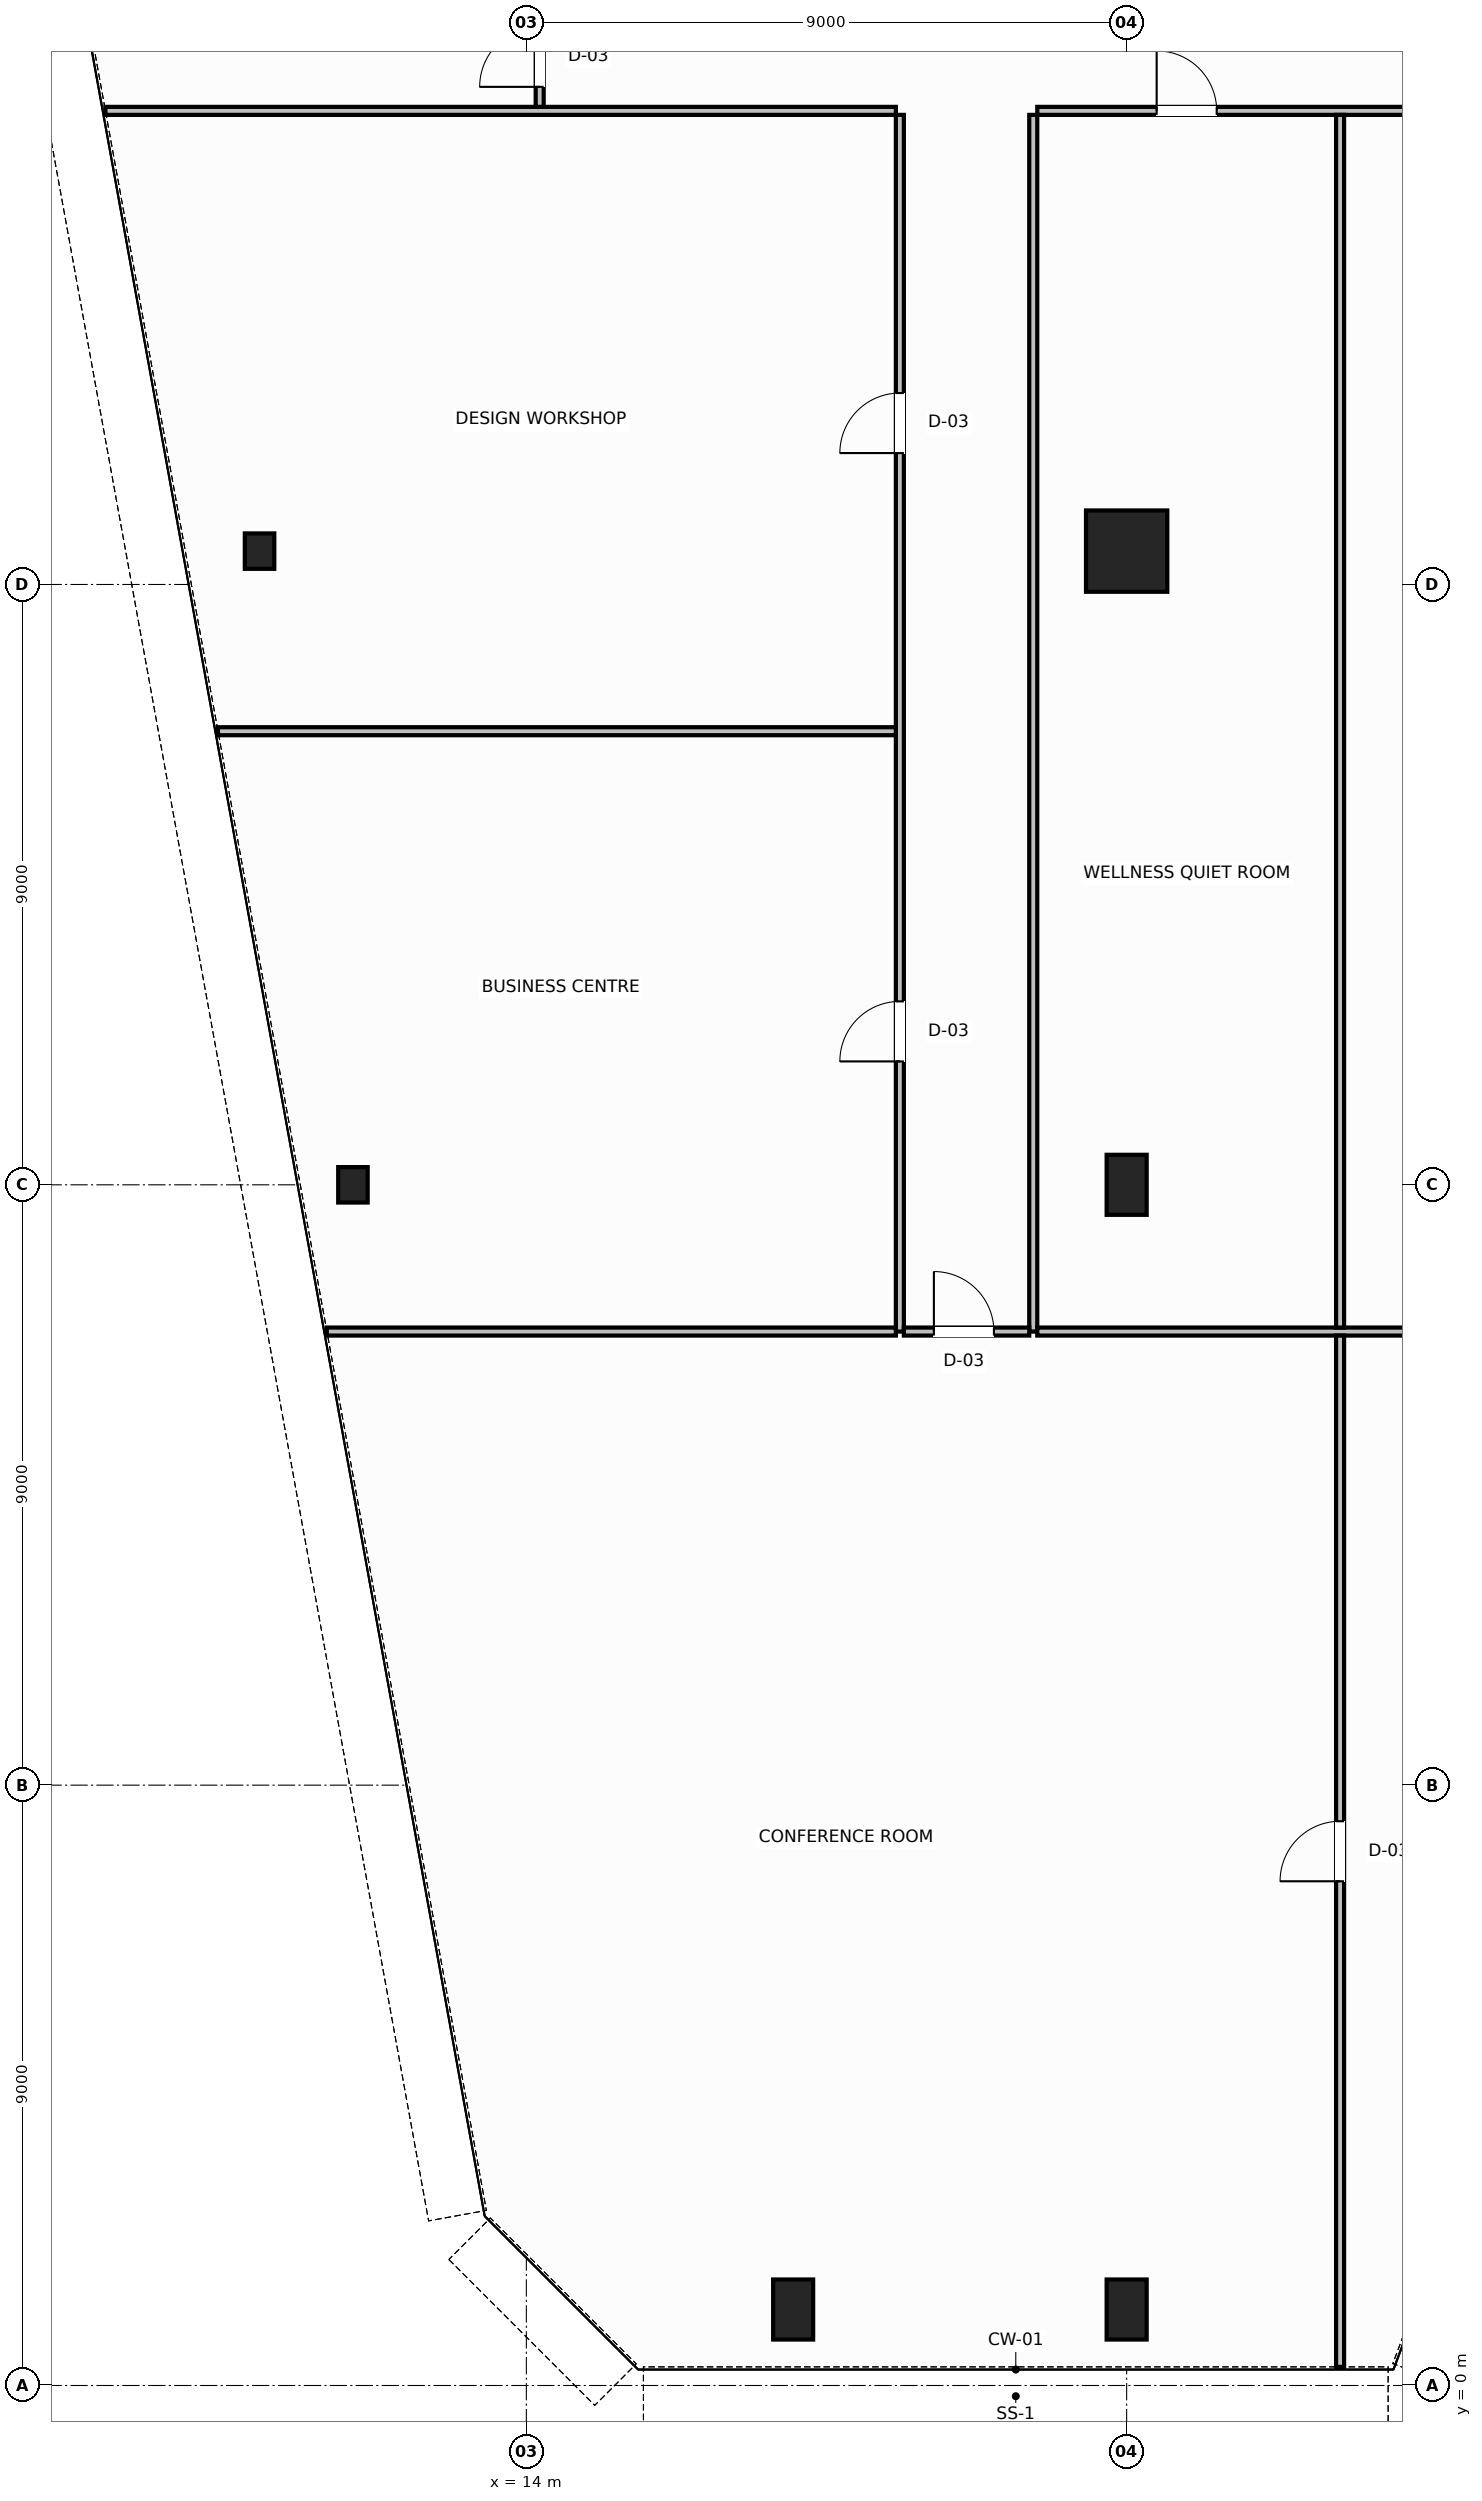
"""IFC4 building model, lengths in metres.
Left out: names, types, materials, properties, quantities, classifications, styles, units other than length and angle.
Written with IfcOpenShell. Run it as: python <this file> out.ifc"""

import sys

from ifc_helpers import new_model, si_unit, direction, frame, frame_2d, origin, origin_2d, place, context, subcontext, project, spatial, rectangle, hollow_rectangle, hollow_circle, i_section, extrude, source, transform, mapped, element, fill, save


model = new_model("IFC4")
c1 = context("Model", 3, precision=1e-05, world=origin(), true_north=direction((0.0, 1.0)))
c2 = subcontext(c1, "Body", "Model", "MODEL_VIEW")
j1 = project(units=[si_unit("LENGTHUNIT", "METRE"), si_unit("PLANEANGLEUNIT", "RADIAN")], contexts=[c1])
p1 = place(None, origin())
s1 = spatial("IfcSite", under=j1, at=p1, CompositionType="ELEMENT")
p2 = place(p1, origin())
s2 = spatial("IfcBuilding", under=s1, at=p2, CompositionType="ELEMENT")
p3 = place(p2, frame((0.0, 0.0, 22.6)))
s3 = spatial("IfcBuildingStorey", under=s2, at=p3, CompositionType="ELEMENT", Elevation=22.6)
m1 = source(origin(), c2, "Body", "SweptSolid", [
    extrude(i_section(OverallWidth=0.442, OverallDepth=0.531, WebThickness=0.065, FlangeThickness=0.076, FilletRadius=0.015, at=origin_2d()), origin(), (0.0, 0.0, 1.0), 3.8),
])
for number, where, z_axis, x_axis in (
    (1, (10.0, 27.5, 0.0), (0.0, 0.0, 1.0), (1.0, 0.0, 0.0)),
    (2, (11.4, 18.0, 0.0), (0.0, 0.0, 1.0), (1.0, 0.0, 0.0)),
):
    element("IfcColumn", number, at=place(p3, frame(where, z_axis=z_axis, x_axis=x_axis)), inside=s3, PredefinedType="COLUMN", context=c2, shape_type="MappedRepresentation", body=[
        mapped(m1, transform((0.0, 0.0, 0.0), scale=1.0)),
    ])
m2 = source(origin(), c2, "Body", "SweptSolid", [
    extrude(hollow_circle(Radius=0.61, WallThickness=0.05, at=origin_2d()), origin(), (0.0, 0.0, 1.0), 3.8),
])
p4 = place(p3, frame((23.0, 27.5, 0.0), z_axis=(0.0, 0.0, 1.0), x_axis=(1.0, 0.0, 0.0)))
e3 = element("IfcColumn", 3, at=p4, inside=s3, PredefinedType="COLUMN", context=c2, shape_type="MappedRepresentation", body=[
    mapped(m2, transform((0.0, 0.0, 0.0), scale=1.0)),
])
m3 = source(origin(), c2, "Body", "SweptSolid", [
    extrude(hollow_rectangle(XDim=0.6, YDim=0.9, WallThickness=0.04, InnerFilletRadius=0.04, OuterFilletRadius=0.08, at=origin_2d()), origin(), (0.0, 0.0, 1.0), 3.8),
])
p5 = place(p3, frame((23.0, 18.0, 0.0), z_axis=(0.0, 0.0, 1.0), x_axis=(1.0, 0.0, 0.0)))
e4 = element("IfcColumn", 4, at=p5, inside=s3, PredefinedType="COLUMN", context=c2, shape_type="MappedRepresentation", body=[
    mapped(m3, transform((0.0, 0.0, 0.0), scale=1.0)),
])
m4 = source(origin(), c2, "Body", "SweptSolid", [
    extrude(hollow_rectangle(XDim=0.6, YDim=0.9, WallThickness=0.04, InnerFilletRadius=0.04, OuterFilletRadius=0.08, at=origin_2d()), origin(), (0.0, 0.0, 1.0), 3.743),
])
for number, where, z_axis, x_axis in (
    (5, (18.0, 1.139, 0.032), (0.0, 0.064, 0.998), (-1.0, 0.0, 0.0)),
    (6, (23.0, 1.139, 0.032), (0.0, 0.064, 0.998), (-1.0, 0.0, 0.0)),
):
    element("IfcColumn", number, at=place(p3, frame(where, z_axis=z_axis, x_axis=x_axis)), inside=s3, PredefinedType="COLUMN", context=c2, shape_type="MappedRepresentation", body=[
        mapped(m4, transform((0.0, 0.0, 0.0), scale=1.0)),
    ])
p6 = place(p3, frame((21.66, 34.1, 0.0), z_axis=(0.0, 0.0, 1.0), x_axis=(1.0, 0.0, 0.0)))
e7 = element("IfcWall", 7, at=p6, inside=s3, PredefinedType="PARTITIONING", context=c2, shape_type="SweptSolid", body=[
    extrude(rectangle(XDim=24.68, YDim=0.12, at=frame_2d((12.34, 0.0))), origin(), (0.0, 0.0, 1.0), 3.58),
])
p7 = place(p6, frame((1.79, 0.0, 0.0)))
e8 = element("IfcOpeningElement", 8, at=p7, cuts=e7, PredefinedType="OPENING", context=c2, shape_type="SweptSolid", body=[
    extrude(rectangle(XDim=0.9, YDim=2.15, at=frame_2d((0.45, 1.075))), frame((0.0, 0.07, 0.0), z_axis=(0.0, -1.0, 0.0), x_axis=(1.0, 0.0, 0.0)), (0.0, 0.0, 1.0), 0.14),
])
p8 = place(p6, frame((14.19, 0.0, 0.0)))
e9 = element("IfcOpeningElement", 9, at=p8, cuts=e7, PredefinedType="OPENING", context=c2, shape_type="SweptSolid", body=[
    extrude(rectangle(XDim=0.9, YDim=2.15, at=frame_2d((0.45, 1.075))), frame((0.0, 0.07, 0.0), z_axis=(0.0, -1.0, 0.0), x_axis=(1.0, 0.0, 0.0)), (0.0, 0.0, 1.0), 0.14),
])
p9 = place(p3, frame((7.689, 34.1, 0.0), z_axis=(0.0, 0.0, 1.0), x_axis=(1.0, 0.0, 0.0)))
e10 = element("IfcWall", 10, at=p9, inside=s3, PredefinedType="PARTITIONING", context=c2, shape_type="SweptSolid", body=[
    extrude(rectangle(XDim=11.851, YDim=0.12, at=frame_2d((5.926, 0.0))), origin(), (0.0, 0.0, 1.0), 3.58),
])
p10 = place(p3, frame((14.2, 34.16, 0.0), z_axis=(0.0, 0.0, 1.0), x_axis=(0.0, 1.0, 0.0)))
e11 = element("IfcWall", 11, at=p10, inside=s3, PredefinedType="PARTITIONING", context=c2, shape_type="SweptSolid", body=[
    extrude(rectangle(XDim=2.28, YDim=0.12, at=frame_2d((1.14, 0.0))), origin(), (0.0, 0.0, 1.0), 3.58),
])
p11 = place(p10, frame((0.3, 0.0, 0.0)))
e12 = element("IfcOpeningElement", 12, at=p11, cuts=e11, PredefinedType="OPENING", context=c2, shape_type="SweptSolid", body=[
    extrude(rectangle(XDim=0.9, YDim=2.15, at=frame_2d((0.45, 1.075))), frame((0.0, 0.07, 0.0), z_axis=(0.0, -1.0, 0.0), x_axis=(1.0, 0.0, 0.0)), (0.0, 0.0, 1.0), 0.14),
])
p12 = place(p3, frame((19.6, 15.8, 0.0), z_axis=(0.0, 0.0, 1.0), x_axis=(0.0, 1.0, 0.0)))
e13 = element("IfcWall", 13, at=p12, inside=s3, PredefinedType="PARTITIONING", context=c2, shape_type="SweptSolid", body=[
    extrude(rectangle(XDim=18.24, YDim=0.12, at=frame_2d((9.12, 0.0))), origin(), (0.0, 0.0, 1.0), 3.58),
])
p13 = place(p12, frame((4.05, 0.0, 0.0)))
e14 = element("IfcOpeningElement", 14, at=p13, cuts=e13, PredefinedType="OPENING", context=c2, shape_type="SweptSolid", body=[
    extrude(rectangle(XDim=0.9, YDim=2.15, at=frame_2d((0.45, 1.075))), frame((0.0, 0.07, 0.0), z_axis=(0.0, -1.0, 0.0), x_axis=(1.0, 0.0, 0.0)), (0.0, 0.0, 1.0), 0.14),
])
p14 = place(p12, frame((13.17, 0.0, 0.0)))
e15 = element("IfcOpeningElement", 15, at=p14, cuts=e13, PredefinedType="OPENING", context=c2, shape_type="SweptSolid", body=[
    extrude(rectangle(XDim=0.9, YDim=2.15, at=frame_2d((0.45, 1.075))), frame((0.0, 0.07, 0.0), z_axis=(0.0, -1.0, 0.0), x_axis=(1.0, 0.0, 0.0)), (0.0, 0.0, 1.0), 0.14),
])
p15 = place(p3, frame((21.6, 15.8, 0.0), z_axis=(0.0, 0.0, 1.0), x_axis=(0.0, 1.0, 0.0)))
e16 = element("IfcWall", 16, at=p15, inside=s3, PredefinedType="PARTITIONING", context=c2, shape_type="SweptSolid", body=[
    extrude(rectangle(XDim=18.24, YDim=0.12, at=frame_2d((9.12, 0.0))), origin(), (0.0, 0.0, 1.0), 3.58),
])
p16 = place(p3, frame((19.66, 15.8, 0.0), z_axis=(0.0, 0.0, 1.0), x_axis=(1.0, 0.0, 0.0)))
e17 = element("IfcWall", 17, at=p16, inside=s3, PredefinedType="PARTITIONING", context=c2, shape_type="SweptSolid", body=[
    extrude(rectangle(XDim=1.88, YDim=0.12, at=frame_2d((0.94, 0.0))), origin(), (0.0, 0.0, 1.0), 3.58),
])
p17 = place(p16, frame((0.45, 0.0, 0.0)))
e18 = element("IfcOpeningElement", 18, at=p17, cuts=e17, PredefinedType="OPENING", context=c2, shape_type="SweptSolid", body=[
    extrude(rectangle(XDim=0.9, YDim=2.15, at=frame_2d((0.45, 1.075))), frame((0.0, 0.07, 0.0), z_axis=(0.0, -1.0, 0.0), x_axis=(1.0, 0.0, 0.0)), (0.0, 0.0, 1.0), 0.14),
])
p18 = place(p3, frame((11.01, 15.8, 0.0), z_axis=(0.0, 0.0, 1.0), x_axis=(1.0, 0.0, 0.0)))
e19 = element("IfcWall", 19, at=p18, inside=s3, PredefinedType="PARTITIONING", context=c2, shape_type="SweptSolid", body=[
    extrude(rectangle(XDim=8.531, YDim=0.12, at=frame_2d((4.265, 0.0))), origin(), (0.0, 0.0, 1.0), 3.58),
])
p19 = place(p3, frame((9.376, 24.8, 0.0), z_axis=(0.0, 0.0, 1.0), x_axis=(1.0, 0.0, 0.0)))
e20 = element("IfcWall", 20, at=p19, inside=s3, PredefinedType="PARTITIONING", context=c2, shape_type="SweptSolid", body=[
    extrude(rectangle(XDim=10.164, YDim=0.12, at=frame_2d((5.082, 0.0))), origin(), (0.0, 0.0, 1.0), 3.58),
])
p20 = place(p3, frame((21.66, 15.8, 0.0), z_axis=(0.0, 0.0, 1.0), x_axis=(1.0, 0.0, 0.0)))
e21 = element("IfcWall", 21, at=p20, inside=s3, PredefinedType="PARTITIONING", context=c2, shape_type="SweptSolid", body=[
    extrude(rectangle(XDim=24.68, YDim=0.12, at=frame_2d((12.34, 0.0))), origin(), (0.0, 0.0, 1.0), 3.58),
])
p21 = place(p3, frame((26.2, 15.86, 0.0), z_axis=(0.0, 0.0, 1.0), x_axis=(0.0, 1.0, 0.0)))
e22 = element("IfcWall", 22, at=p21, inside=s3, PredefinedType="PARTITIONING", context=c2, shape_type="SweptSolid", body=[
    extrude(rectangle(XDim=18.18, YDim=0.12, at=frame_2d((9.09, 0.0))), origin(), (0.0, 0.0, 1.0), 3.58),
])
p22 = place(p3, frame((26.2, 0.279, 0.0), z_axis=(0.0, 0.0, 1.0), x_axis=(0.0, 1.0, 0.0)))
e23 = element("IfcWall", 23, at=p22, inside=s3, PredefinedType="PARTITIONING", context=c2, shape_type="SweptSolid", body=[
    extrude(rectangle(XDim=15.461, YDim=0.12, at=frame_2d((7.73, 0.0))), origin(), (0.0, 0.0, 1.0), 3.58),
])
p23 = place(p22, frame((7.28, 0.0, 0.0)))
e24 = element("IfcOpeningElement", 24, at=p23, cuts=e23, PredefinedType="OPENING", context=c2, shape_type="SweptSolid", body=[
    extrude(rectangle(XDim=0.9, YDim=2.15, at=frame_2d((0.45, 1.075))), frame((0.0, 0.07, 0.0), z_axis=(0.0, -1.0, 0.0), x_axis=(1.0, 0.0, 0.0)), (0.0, 0.0, 1.0), 0.14),
])
m5 = source(origin(), c2, "Body", "SweptSolid", [
    extrude(rectangle(XDim=0.9, YDim=2.15, at=frame_2d((0.45, 1.075))), frame((0.0, 0.025, 0.0), z_axis=(0.0, -1.0, 0.0), x_axis=(1.0, 0.0, 0.0)), (0.0, 0.0, 1.0), 0.05),
])
p24 = place(p11, origin())
e25 = element("IfcDoor", 25, at=p24, inside=s3, OperationType="SINGLE_SWING_LEFT", PredefinedType="DOOR", context=c2, shape_type="MappedRepresentation", body=[
    mapped(m5, transform((0.0, 0.0, 0.0), scale=1.0)),
])
fill(e12, e25)
p25 = place(p13, origin())
e26 = element("IfcDoor", 26, at=p25, inside=s3, OperationType="SINGLE_SWING_LEFT", PredefinedType="DOOR", context=c2, shape_type="MappedRepresentation", body=[
    mapped(m5, transform((0.0, 0.0, 0.0), scale=1.0)),
])
fill(e14, e26)
p26 = place(p14, origin())
e27 = element("IfcDoor", 27, at=p26, inside=s3, OperationType="SINGLE_SWING_RIGHT", PredefinedType="DOOR", context=c2, shape_type="MappedRepresentation", body=[
    mapped(m5, transform((0.0, 0.0, 0.0), scale=1.0)),
])
fill(e15, e27)
p27 = place(p7, origin())
e28 = element("IfcDoor", 28, at=p27, inside=s3, OperationType="SINGLE_SWING_LEFT", PredefinedType="DOOR", context=c2, shape_type="MappedRepresentation", body=[
    mapped(m5, transform((0.0, 0.0, 0.0), scale=1.0)),
])
fill(e8, e28)
p28 = place(p17, origin())
e29 = element("IfcDoor", 29, at=p28, inside=s3, OperationType="SINGLE_SWING_LEFT", PredefinedType="DOOR", context=c2, shape_type="MappedRepresentation", body=[
    mapped(m5, transform((0.0, 0.0, 0.0), scale=1.0)),
])
fill(e18, e29)
p29 = place(p23, origin())
e30 = element("IfcDoor", 30, at=p29, inside=s3, OperationType="SINGLE_SWING_RIGHT", PredefinedType="DOOR", context=c2, shape_type="MappedRepresentation", body=[
    mapped(m5, transform((0.0, 0.0, 0.0), scale=1.0)),
])
fill(e24, e30)
save(model, sys.argv[1])
